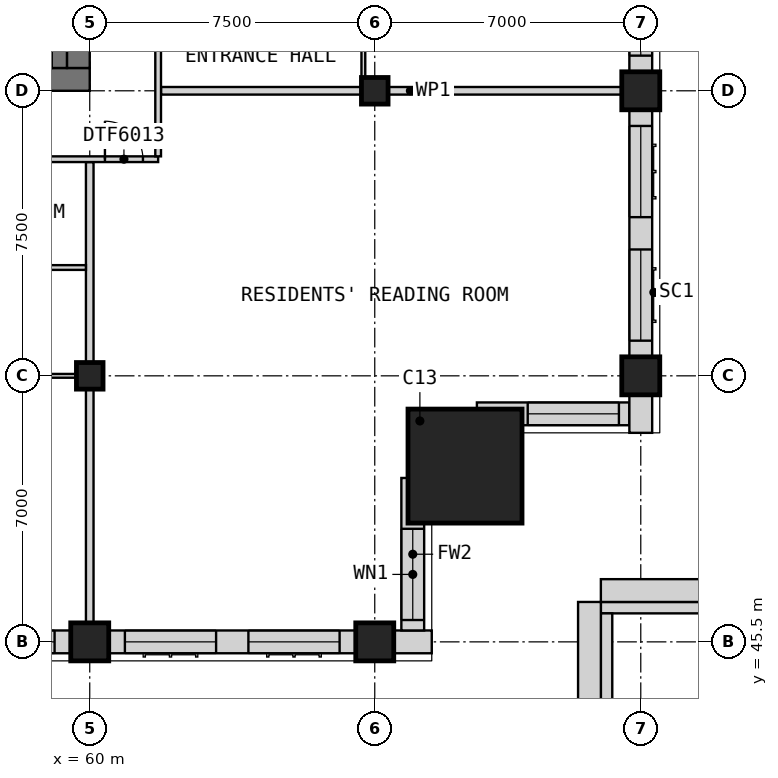
"""IFC4 building model, lengths in metres.
Left out: names, types, materials, properties, quantities, classifications, styles, units other than length and angle.
Written with IfcOpenShell. Run it as: python <this file> out.ifc"""

import sys

from ifc_helpers import new_model, si_unit, direction, frame, frame_2d, origin, origin_2d, place, context, subcontext, project, spatial, rectangle, extrude, element, fill, save


model = new_model("IFC4")
c1 = context("Model", 3, precision=1e-05, world=origin(), true_north=direction((0.0, 1.0)))
c2 = subcontext(c1, "Body", "Model", "MODEL_VIEW")
j1 = project(units=[si_unit("LENGTHUNIT", "METRE"), si_unit("PLANEANGLEUNIT", "RADIAN")], contexts=[c1])
p1 = place(None, origin())
s1 = spatial("IfcSite", under=j1, at=p1, CompositionType="ELEMENT")
p2 = place(p1, origin())
s2 = spatial("IfcBuilding", under=s1, at=p2, CompositionType="ELEMENT")
p3 = place(p2, frame((0.0, 0.0, 266.2)))
s3 = spatial("IfcBuildingStorey", under=s2, at=p3, CompositionType="ELEMENT", Elevation=266.2)
p4 = place(p3, frame((60.0, 45.5, 0.0), z_axis=(0.0, 0.0, 1.0), x_axis=(1.0, 0.0, 0.0)))
e1 = element("IfcColumn", 1, at=p4, inside=s3, PredefinedType="COLUMN", context=c2, shape_type="SweptSolid", body=[
    extrude(rectangle(XDim=1.0, YDim=1.0, at=origin_2d()), origin(), (0.0, 0.0, 1.0), 3.5),
])
p5 = place(p3, frame((60.0, 52.5, 0.0), z_axis=(0.0, 0.0, 1.0), x_axis=(1.0, 0.0, 0.0)))
e2 = element("IfcColumn", 2, at=p5, inside=s3, PredefinedType="COLUMN", context=c2, shape_type="SweptSolid", body=[
    extrude(rectangle(XDim=0.7, YDim=0.7, at=origin_2d()), origin(), (0.0, 0.0, 1.0), 3.5),
])
p6 = place(p3, frame((67.5, 45.5, 0.0), z_axis=(0.0, 0.0, 1.0), x_axis=(1.0, 0.0, 0.0)))
e3 = element("IfcColumn", 3, at=p6, inside=s3, PredefinedType="COLUMN", context=c2, shape_type="SweptSolid", body=[
    extrude(rectangle(XDim=1.0, YDim=1.0, at=origin_2d()), origin(), (0.0, 0.0, 1.0), 3.5),
])
p7 = place(p3, frame((67.5, 60.0, 0.0), z_axis=(0.0, 0.0, 1.0), x_axis=(1.0, 0.0, 0.0)))
e4 = element("IfcColumn", 4, at=p7, inside=s3, PredefinedType="COLUMN", context=c2, shape_type="SweptSolid", body=[
    extrude(rectangle(XDim=0.7, YDim=0.7, at=origin_2d()), origin(), (0.0, 0.0, 1.0), 3.5),
])
for number, where, z_axis, x_axis in (
    (5, (74.5, 52.5, 0.0), (0.0, 0.0, 1.0), (1.0, 0.0, 0.0)),
    (6, (74.5, 60.0, 0.0), (0.0, 0.0, 1.0), (1.0, 0.0, 0.0)),
):
    element("IfcColumn", number, at=place(p3, frame(where, z_axis=z_axis, x_axis=x_axis)), inside=s3, PredefinedType="COLUMN", context=c2, shape_type="SweptSolid", body=[
        extrude(rectangle(XDim=1.0, YDim=1.0, at=origin_2d()), origin(), (0.0, 0.0, 1.0), 3.5),
    ])
p8 = place(p3, frame((69.875, 50.125, 0.0), z_axis=(0.0, 0.0, 1.0), x_axis=(0.0, 1.0, 0.0)))
e7 = element("IfcColumn", 7, at=p8, inside=s3, PredefinedType="COLUMN", context=c2, shape_type="SweptSolid", body=[
    extrude(rectangle(XDim=3.0, YDim=3.0, at=origin_2d()), origin(), (0.49, 0.49, 0.722), 4.851),
])
p9 = place(p3, frame((30.0, 60.3, 0.0), z_axis=(0.0, 0.0, 1.0), x_axis=(1.0, 0.0, 0.0)))
e8 = element("IfcWall", 8, at=p9, inside=s3, PredefinedType="SHEAR", context=c2, shape_type="SweptSolid", body=[
    extrude(rectangle(XDim=30.0, YDim=0.6, at=frame_2d((15.0, 0.0))), origin(), (0.0, 0.0, 1.0), 3.5),
])
p10 = place(p9, frame((21.9, 0.0, 0.0)))
e9 = element("IfcOpeningElement", 9, at=p10, cuts=e8, PredefinedType="OPENING", context=c2, shape_type="SweptSolid", body=[
    extrude(rectangle(XDim=1.8, YDim=2.1, at=frame_2d((0.9, 1.05))), frame((0.0, 0.31, 0.0), z_axis=(0.0, -1.0, 0.0), x_axis=(1.0, 0.0, 0.0)), (0.0, 0.0, 1.0), 0.62),
])
p11 = place(p9, frame((26.5, 0.0, 0.0)))
e10 = element("IfcOpeningElement", 10, at=p11, cuts=e8, PredefinedType="OPENING", context=c2, shape_type="SweptSolid", body=[
    extrude(rectangle(XDim=1.2, YDim=2.1, at=frame_2d((0.6, 1.05))), frame((0.0, 0.31, 0.0), z_axis=(0.0, -1.0, 0.0), x_axis=(1.0, 0.0, 0.0)), (0.0, 0.0, 1.0), 0.62),
])
p12 = place(p3, frame((59.7, 60.6, 0.0), z_axis=(0.0, 0.0, 1.0), x_axis=(0.0, 1.0, 0.0)))
e11 = element("IfcWall", 11, at=p12, inside=s3, PredefinedType="SHEAR", context=c2, shape_type="SweptSolid", body=[
    extrude(rectangle(XDim=21.3, YDim=0.6, at=frame_2d((10.65, 0.0))), origin(), (0.0, 0.0, 1.0), 3.5),
])
p13 = place(p12, frame((14.9, 0.0, 0.0)))
e12 = element("IfcOpeningElement", 12, at=p13, cuts=e11, PredefinedType="OPENING", context=c2, shape_type="SweptSolid", body=[
    extrude(rectangle(XDim=1.8, YDim=2.1, at=frame_2d((0.9, 1.05))), frame((0.0, 0.31, 0.0), z_axis=(0.0, -1.0, 0.0), x_axis=(1.0, 0.0, 0.0)), (0.0, 0.0, 1.0), 0.62),
])
p14 = place(p3, frame((73.45, 46.4, 0.0), z_axis=(0.0, 0.0, 1.0), x_axis=(1.0, 0.0, 0.0)))
e13 = element("IfcWall", 13, at=p14, inside=s3, PredefinedType="PARAPET", context=c2, shape_type="SweptSolid", body=[
    extrude(rectangle(XDim=5.0, YDim=0.3, at=frame_2d((2.5, 0.0))), origin(), (0.0, 0.0, 1.0), 1.2),
])
p15 = place(p3, frame((73.45, 46.85, 0.0), z_axis=(0.0, 0.0, 1.0), x_axis=(1.0, 0.0, 0.0)))
e14 = element("IfcWall", 14, at=p15, inside=s3, PredefinedType="STANDARD", context=c2, shape_type="SweptSolid", body=[
    extrude(rectangle(XDim=4.4, YDim=0.6, at=frame_2d((2.2, 0.0))), origin(), (0.0, 0.0, 1.0), 0.6),
])
p16 = place(p3, frame((73.6, 41.25, 0.0), z_axis=(0.0, 0.0, 1.0), x_axis=(0.0, 1.0, 0.0)))
e15 = element("IfcWall", 15, at=p16, inside=s3, PredefinedType="PARAPET", context=c2, shape_type="SweptSolid", body=[
    extrude(rectangle(XDim=5.0, YDim=0.3, at=frame_2d((2.5, 0.0))), origin(), (0.0, 0.0, 1.0), 1.2),
])
p17 = place(p3, frame((73.15, 46.55, 0.0), z_axis=(0.0, 0.0, 1.0), x_axis=(0.0, -1.0, 0.0)))
e16 = element("IfcWall", 16, at=p17, inside=s3, PredefinedType="STANDARD", context=c2, shape_type="SweptSolid", body=[
    extrude(rectangle(XDim=5.3, YDim=0.6, at=frame_2d((2.65, 0.0))), origin(), (0.0, 0.0, 1.0), 0.6),
])
p18 = place(p3, frame((53.0, 45.5, 0.0), z_axis=(0.0, 0.0, 1.0), x_axis=(1.0, 0.0, 0.0)))
e17 = element("IfcWall", 17, at=p18, inside=s3, PredefinedType="SOLIDWALL", context=c2, shape_type="SweptSolid", body=[
    extrude(rectangle(XDim=6.5, YDim=0.6, at=frame_2d((3.25, 0.0))), origin(), (0.0, 0.0, 1.0), 2.75),
])
p19 = place(p18, frame((0.425, 0.0, 0.8)))
e18 = element("IfcOpeningElement", 18, at=p19, cuts=e17, PredefinedType="OPENING", context=c2, shape_type="SweptSolid", body=[
    extrude(rectangle(XDim=2.4, YDim=1.8, at=frame_2d((1.2, 0.9))), frame((0.0, 0.31, 0.0), z_axis=(0.0, -1.0, 0.0), x_axis=(1.0, 0.0, 0.0)), (0.0, 0.0, 1.0), 0.62),
])
p20 = place(p18, frame((3.675, 0.0, 0.8)))
e19 = element("IfcOpeningElement", 19, at=p20, cuts=e17, PredefinedType="OPENING", context=c2, shape_type="SweptSolid", body=[
    extrude(rectangle(XDim=2.4, YDim=1.8, at=frame_2d((1.2, 0.9))), frame((0.0, 0.31, 0.0), z_axis=(0.0, -1.0, 0.0), x_axis=(1.0, 0.0, 0.0)), (0.0, 0.0, 1.0), 0.62),
])
p21 = place(p3, frame((60.5, 45.5, 0.0), z_axis=(0.0, 0.0, 1.0), x_axis=(1.0, 0.0, 0.0)))
e20 = element("IfcWall", 20, at=p21, inside=s3, PredefinedType="SOLIDWALL", context=c2, shape_type="SweptSolid", body=[
    extrude(rectangle(XDim=6.5, YDim=0.6, at=frame_2d((3.25, 0.0))), origin(), (0.0, 0.0, 1.0), 2.75),
])
p22 = place(p21, frame((0.425, 0.0, 0.8)))
e21 = element("IfcOpeningElement", 21, at=p22, cuts=e20, PredefinedType="OPENING", context=c2, shape_type="SweptSolid", body=[
    extrude(rectangle(XDim=2.4, YDim=1.8, at=frame_2d((1.2, 0.9))), frame((0.0, 0.31, 0.0), z_axis=(0.0, -1.0, 0.0), x_axis=(1.0, 0.0, 0.0)), (0.0, 0.0, 1.0), 0.62),
])
p23 = place(p21, frame((3.675, 0.0, 0.8)))
e22 = element("IfcOpeningElement", 22, at=p23, cuts=e20, PredefinedType="OPENING", context=c2, shape_type="SweptSolid", body=[
    extrude(rectangle(XDim=2.4, YDim=1.8, at=frame_2d((1.2, 0.9))), frame((0.0, 0.31, 0.0), z_axis=(0.0, -1.0, 0.0), x_axis=(1.0, 0.0, 0.0)), (0.0, 0.0, 1.0), 0.62),
])
p24 = place(p3, frame((68.0, 45.5, 0.0), z_axis=(0.0, 0.0, 1.0), x_axis=(1.0, 0.0, 0.0)))
e23 = element("IfcWall", 23, at=p24, inside=s3, PredefinedType="SOLIDWALL", context=c2, shape_type="SweptSolid", body=[
    extrude(rectangle(XDim=1.0, YDim=0.6, at=frame_2d((0.5, 0.0))), origin(), (0.0, 0.0, 1.0), 3.25),
])
p25 = place(p3, frame((68.5, 45.8, 0.0), z_axis=(0.0, 0.0, 1.0), x_axis=(0.0, 1.0, 0.0)))
e24 = element("IfcWall", 24, at=p25, inside=s3, PredefinedType="SOLIDWALL", context=c2, shape_type="SweptSolid", body=[
    extrude(rectangle(XDim=4.012, YDim=0.6, at=frame_2d((2.006, 0.0))), origin(), (0.0, 0.0, 1.0), 3.25),
])
p26 = place(p25, frame((0.275, 0.0, 0.8)))
e25 = element("IfcOpeningElement", 25, at=p26, cuts=e24, PredefinedType="OPENING", context=c2, shape_type="SweptSolid", body=[
    extrude(rectangle(XDim=2.4, YDim=1.8, at=frame_2d((1.2, 0.9))), frame((0.0, 0.31, 0.0), z_axis=(0.0, -1.0, 0.0), x_axis=(1.0, 0.0, 0.0)), (0.0, 0.0, 1.0), 0.62),
])
p27 = place(p3, frame((70.188, 51.5, 0.0), z_axis=(0.0, 0.0, 1.0), x_axis=(1.0, 0.0, 0.0)))
e26 = element("IfcWall", 26, at=p27, inside=s3, PredefinedType="SOLIDWALL", context=c2, shape_type="SweptSolid", body=[
    extrude(rectangle(XDim=4.012, YDim=0.6, at=frame_2d((2.006, 0.0))), origin(), (0.0, 0.0, 1.0), 3.25),
])
p28 = place(p27, frame((1.337, 0.0, 0.8)))
e27 = element("IfcOpeningElement", 27, at=p28, cuts=e26, PredefinedType="OPENING", context=c2, shape_type="SweptSolid", body=[
    extrude(rectangle(XDim=2.4, YDim=1.8, at=frame_2d((1.2, 0.9))), frame((0.0, 0.31, 0.0), z_axis=(0.0, -1.0, 0.0), x_axis=(1.0, 0.0, 0.0)), (0.0, 0.0, 1.0), 0.62),
])
p29 = place(p3, frame((74.5, 51.0, 0.0), z_axis=(0.0, 0.0, 1.0), x_axis=(0.0, 1.0, 0.0)))
e28 = element("IfcWall", 28, at=p29, inside=s3, PredefinedType="SOLIDWALL", context=c2, shape_type="SweptSolid", body=[
    extrude(rectangle(XDim=1.0, YDim=0.6, at=frame_2d((0.5, 0.0))), origin(), (0.0, 0.0, 1.0), 3.25),
])
p30 = place(p3, frame((74.5, 53.0, 0.0), z_axis=(0.0, 0.0, 1.0), x_axis=(0.0, 1.0, 0.0)))
e29 = element("IfcWall", 29, at=p30, inside=s3, PredefinedType="SOLIDWALL", context=c2, shape_type="SweptSolid", body=[
    extrude(rectangle(XDim=6.5, YDim=0.6, at=frame_2d((3.25, 0.0))), origin(), (0.0, 0.0, 1.0), 2.75),
])
p31 = place(p30, frame((0.425, 0.0, 0.8)))
e30 = element("IfcOpeningElement", 30, at=p31, cuts=e29, PredefinedType="OPENING", context=c2, shape_type="SweptSolid", body=[
    extrude(rectangle(XDim=2.4, YDim=1.8, at=frame_2d((1.2, 0.9))), frame((0.0, 0.31, 0.0), z_axis=(0.0, -1.0, 0.0), x_axis=(1.0, 0.0, 0.0)), (0.0, 0.0, 1.0), 0.62),
])
p32 = place(p30, frame((3.675, 0.0, 0.8)))
e31 = element("IfcOpeningElement", 31, at=p32, cuts=e29, PredefinedType="OPENING", context=c2, shape_type="SweptSolid", body=[
    extrude(rectangle(XDim=2.4, YDim=1.8, at=frame_2d((1.2, 0.9))), frame((0.0, 0.31, 0.0), z_axis=(0.0, -1.0, 0.0), x_axis=(1.0, 0.0, 0.0)), (0.0, 0.0, 1.0), 0.62),
])
p33 = place(p3, frame((74.5, 60.5, 0.0), z_axis=(0.0, 0.0, 1.0), x_axis=(0.0, 1.0, 0.0)))
e32 = element("IfcWall", 32, at=p33, inside=s3, PredefinedType="SOLIDWALL", context=c2, shape_type="SweptSolid", body=[
    extrude(rectangle(XDim=6.5, YDim=0.6, at=frame_2d((3.25, 0.0))), origin(), (0.0, 0.0, 1.0), 2.75),
])
p34 = place(p33, frame((0.425, 0.0, 0.8)))
e33 = element("IfcOpeningElement", 33, at=p34, cuts=e32, PredefinedType="OPENING", context=c2, shape_type="SweptSolid", body=[
    extrude(rectangle(XDim=2.4, YDim=1.8, at=frame_2d((1.2, 0.9))), frame((0.0, 0.31, 0.0), z_axis=(0.0, -1.0, 0.0), x_axis=(1.0, 0.0, 0.0)), (0.0, 0.0, 1.0), 0.62),
])
p35 = place(p33, frame((3.675, 0.0, 0.8)))
e34 = element("IfcOpeningElement", 34, at=p35, cuts=e32, PredefinedType="OPENING", context=c2, shape_type="SweptSolid", body=[
    extrude(rectangle(XDim=2.4, YDim=1.8, at=frame_2d((1.2, 0.9))), frame((0.0, 0.31, 0.0), z_axis=(0.0, -1.0, 0.0), x_axis=(1.0, 0.0, 0.0)), (0.0, 0.0, 1.0), 0.62),
])
p36 = place(p3, frame((59.2, 60.6, 0.0), z_axis=(0.0, 0.0, 1.0), x_axis=(0.0, 1.0, 0.0)))
e35 = element("IfcWall", 35, at=p36, inside=s3, PredefinedType="SOLIDWALL", context=c2, shape_type="SweptSolid", body=[
    extrude(rectangle(XDim=7.9, YDim=0.4, at=frame_2d((3.95, 0.0))), origin(), (0.0, 0.0, 1.0), 3.25),
])
for number, where, z_axis, x_axis in (
    (36, (61.875, 60.0, 0.0), (0.0, 0.0, 1.0), (1.0, 0.0, 0.0)),
    (37, (60.0, 45.0, 0.0), (0.0, 0.0, 1.0), (0.0, 1.0, 0.0)),
):
    element("IfcWall", number, at=place(p3, frame(where, z_axis=z_axis, x_axis=x_axis)), inside=s3, PredefinedType="PARTITIONING", context=c2, shape_type="SweptSolid", body=[
        extrude(rectangle(XDim=13.125, YDim=0.2, at=frame_2d((6.562, 0.0))), origin(), (0.0, 0.0, 1.0), 3.25),
    ])
p37 = place(p3, frame((33.75, 58.2, 0.0), z_axis=(0.0, 0.0, 1.0), x_axis=(1.0, 0.0, 0.0)))
e38 = element("IfcWall", 38, at=p37, inside=s3, PredefinedType="PARTITIONING", context=c2, shape_type="SweptSolid", body=[
    extrude(rectangle(XDim=28.05, YDim=0.15, at=frame_2d((14.025, 0.0))), origin(), (0.0, 0.0, 1.0), 3.25),
])
p38 = place(p37, frame((3.25, 0.0, 0.0)))
e39 = element("IfcOpeningElement", 39, at=p38, cuts=e38, PredefinedType="OPENING", context=c2, shape_type="SweptSolid", body=[
    extrude(rectangle(XDim=1.0, YDim=2.1, at=frame_2d((0.5, 1.05))), frame((0.0, 0.085, 0.0), z_axis=(0.0, -1.0, 0.0), x_axis=(1.0, 0.0, 0.0)), (0.0, 0.0, 1.0), 0.17),
])
p39 = place(p37, frame((8.925, 0.0, 0.0)))
e40 = element("IfcOpeningElement", 40, at=p39, cuts=e38, PredefinedType="OPENING", context=c2, shape_type="SweptSolid", body=[
    extrude(rectangle(XDim=0.9, YDim=2.1, at=frame_2d((0.45, 1.05))), frame((0.0, 0.085, 0.0), z_axis=(0.0, -1.0, 0.0), x_axis=(1.0, 0.0, 0.0)), (0.0, 0.0, 1.0), 0.17),
])
p40 = place(p37, frame((20.175, 0.0, 0.0)))
e41 = element("IfcOpeningElement", 41, at=p40, cuts=e38, PredefinedType="OPENING", context=c2, shape_type="SweptSolid", body=[
    extrude(rectangle(XDim=0.9, YDim=2.1, at=frame_2d((0.45, 1.05))), frame((0.0, 0.085, 0.0), z_axis=(0.0, -1.0, 0.0), x_axis=(1.0, 0.0, 0.0)), (0.0, 0.0, 1.0), 0.17),
])
p41 = place(p37, frame((26.65, 0.0, 0.0)))
e42 = element("IfcOpeningElement", 42, at=p41, cuts=e38, PredefinedType="OPENING", context=c2, shape_type="SweptSolid", body=[
    extrude(rectangle(XDim=1.0, YDim=2.1, at=frame_2d((0.5, 1.05))), frame((0.0, 0.085, 0.0), z_axis=(0.0, -1.0, 0.0), x_axis=(1.0, 0.0, 0.0)), (0.0, 0.0, 1.0), 0.17),
])
p42 = place(p3, frame((61.8, 58.275, 0.0), z_axis=(0.0, 0.0, 1.0), x_axis=(0.0, 1.0, 0.0)))
e43 = element("IfcWall", 43, at=p42, inside=s3, PredefinedType="PARTITIONING", context=c2, shape_type="SweptSolid", body=[
    extrude(rectangle(XDim=25.95, YDim=0.15, at=frame_2d((12.975, 0.0))), origin(), (0.0, 0.0, 1.0), 3.25),
])
p43 = place(p42, frame((3.15, 0.0, 0.0)))
e44 = element("IfcOpeningElement", 44, at=p43, cuts=e43, PredefinedType="OPENING", context=c2, shape_type="SweptSolid", body=[
    extrude(rectangle(XDim=0.9, YDim=2.1, at=frame_2d((0.45, 1.05))), frame((0.0, 0.085, 0.0), z_axis=(0.0, -1.0, 0.0), x_axis=(1.0, 0.0, 0.0)), (0.0, 0.0, 1.0), 0.17),
])
p44 = place(p42, frame((14.4, 0.0, 0.0)))
e45 = element("IfcOpeningElement", 45, at=p44, cuts=e43, PredefinedType="OPENING", context=c2, shape_type="SweptSolid", body=[
    extrude(rectangle(XDim=0.9, YDim=2.1, at=frame_2d((0.45, 1.05))), frame((0.0, 0.085, 0.0), z_axis=(0.0, -1.0, 0.0), x_axis=(1.0, 0.0, 0.0)), (0.0, 0.0, 1.0), 0.17),
])
p45 = place(p3, frame((41.35, 52.5, 0.0), z_axis=(0.0, 0.0, 1.0), x_axis=(1.0, 0.0, 0.0)))
e46 = element("IfcWall", 46, at=p45, inside=s3, PredefinedType="PARTITIONING", context=c2, shape_type="SweptSolid", body=[
    extrude(rectangle(XDim=18.55, YDim=0.1, at=frame_2d((9.275, 0.0))), origin(), (0.0, 0.0, 1.0), 3.25),
])
p46 = place(p45, frame((1.325, 0.0, 0.0)))
e47 = element("IfcOpeningElement", 47, at=p46, cuts=e46, PredefinedType="OPENING", context=c2, shape_type="SweptSolid", body=[
    extrude(rectangle(XDim=0.9, YDim=2.1, at=frame_2d((0.45, 1.05))), frame((0.0, 0.06, 0.0), z_axis=(0.0, -1.0, 0.0), x_axis=(1.0, 0.0, 0.0)), (0.0, 0.0, 1.0), 0.12),
])
p47 = place(p45, frame((8.825, 0.0, 0.0)))
e48 = element("IfcOpeningElement", 48, at=p47, cuts=e46, PredefinedType="OPENING", context=c2, shape_type="SweptSolid", body=[
    extrude(rectangle(XDim=0.9, YDim=2.1, at=frame_2d((0.45, 1.05))), frame((0.0, 0.06, 0.0), z_axis=(0.0, -1.0, 0.0), x_axis=(1.0, 0.0, 0.0)), (0.0, 0.0, 1.0), 0.12),
])
p48 = place(p45, frame((12.575, 0.0, 0.0)))
e49 = element("IfcOpeningElement", 49, at=p48, cuts=e46, PredefinedType="OPENING", context=c2, shape_type="SweptSolid", body=[
    extrude(rectangle(XDim=0.9, YDim=2.1, at=frame_2d((0.45, 1.05))), frame((0.0, 0.06, 0.0), z_axis=(0.0, -1.0, 0.0), x_axis=(1.0, 0.0, 0.0)), (0.0, 0.0, 1.0), 0.12),
])
p49 = place(p3, frame((67.2, 60.1, 0.0), z_axis=(0.0, 0.0, 1.0), x_axis=(0.0, 1.0, 0.0)))
e50 = element("IfcWall", 50, at=p49, inside=s3, PredefinedType="PARTITIONING", context=c2, shape_type="SweptSolid", body=[
    extrude(rectangle(XDim=22.3, YDim=0.1, at=frame_2d((11.15, 0.0))), origin(), (0.0, 0.0, 1.0), 3.25),
])
p50 = place(p49, frame((1.325, 0.0, 0.0)))
e51 = element("IfcOpeningElement", 51, at=p50, cuts=e50, PredefinedType="OPENING", context=c2, shape_type="SweptSolid", body=[
    extrude(rectangle(XDim=0.9, YDim=2.1, at=frame_2d((0.45, 1.05))), frame((0.0, 0.06, 0.0), z_axis=(0.0, -1.0, 0.0), x_axis=(1.0, 0.0, 0.0)), (0.0, 0.0, 1.0), 0.12),
])
p51 = place(p49, frame((8.825, 0.0, 0.0)))
e52 = element("IfcOpeningElement", 52, at=p51, cuts=e50, PredefinedType="OPENING", context=c2, shape_type="SweptSolid", body=[
    extrude(rectangle(XDim=0.9, YDim=2.1, at=frame_2d((0.45, 1.05))), frame((0.0, 0.06, 0.0), z_axis=(0.0, -1.0, 0.0), x_axis=(1.0, 0.0, 0.0)), (0.0, 0.0, 1.0), 0.12),
])
p52 = place(p49, frame((12.575, 0.0, 0.0)))
e53 = element("IfcOpeningElement", 53, at=p52, cuts=e50, PredefinedType="OPENING", context=c2, shape_type="SweptSolid", body=[
    extrude(rectangle(XDim=0.9, YDim=2.1, at=frame_2d((0.45, 1.05))), frame((0.0, 0.06, 0.0), z_axis=(0.0, -1.0, 0.0), x_axis=(1.0, 0.0, 0.0)), (0.0, 0.0, 1.0), 0.12),
])
p53 = place(p49, frame((20.075, 0.0, 0.0)))
e54 = element("IfcOpeningElement", 54, at=p53, cuts=e50, PredefinedType="OPENING", context=c2, shape_type="SweptSolid", body=[
    extrude(rectangle(XDim=0.9, YDim=2.1, at=frame_2d((0.45, 1.05))), frame((0.0, 0.06, 0.0), z_axis=(0.0, -1.0, 0.0), x_axis=(1.0, 0.0, 0.0)), (0.0, 0.0, 1.0), 0.12),
])
p54 = place(p3, frame((56.25, 55.35, 0.0), z_axis=(0.0, 0.0, 1.0), x_axis=(1.0, 0.0, 0.0)))
e55 = element("IfcWall", 55, at=p54, inside=s3, PredefinedType="PARTITIONING", context=c2, shape_type="SweptSolid", body=[
    extrude(rectangle(XDim=3.65, YDim=0.125, at=frame_2d((1.825, 0.0))), origin(), (0.0, 0.0, 1.0), 3.25),
])
p55 = place(p20, origin())
e56 = element("IfcWindow", 56, at=p55, inside=s3, PartitioningType="SINGLE_PANEL", PredefinedType="WINDOW", context=c2, shape_type="SweptSolid", body=[
    extrude(rectangle(XDim=2.4, YDim=1.8, at=frame_2d((1.2, 0.9))), frame((0.0, -0.07, 0.0), z_axis=(0.0, -1.0, 0.0), x_axis=(1.0, 0.0, 0.0)), (0.0, 0.0, 1.0), 0.06),
])
fill(e19, e56)
p56 = place(p22, origin())
e57 = element("IfcWindow", 57, at=p56, inside=s3, PartitioningType="SINGLE_PANEL", PredefinedType="WINDOW", context=c2, shape_type="SweptSolid", body=[
    extrude(rectangle(XDim=2.4, YDim=1.8, at=frame_2d((1.2, 0.9))), frame((0.0, -0.07, 0.0), z_axis=(0.0, -1.0, 0.0), x_axis=(1.0, 0.0, 0.0)), (0.0, 0.0, 1.0), 0.06),
])
fill(e21, e57)
p57 = place(p23, origin())
e58 = element("IfcWindow", 58, at=p57, inside=s3, PartitioningType="SINGLE_PANEL", PredefinedType="WINDOW", context=c2, shape_type="SweptSolid", body=[
    extrude(rectangle(XDim=2.4, YDim=1.8, at=frame_2d((1.2, 0.9))), frame((0.0, -0.07, 0.0), z_axis=(0.0, -1.0, 0.0), x_axis=(1.0, 0.0, 0.0)), (0.0, 0.0, 1.0), 0.06),
])
fill(e22, e58)
p58 = place(p26, origin())
e59 = element("IfcWindow", 59, at=p58, inside=s3, PartitioningType="SINGLE_PANEL", PredefinedType="WINDOW", context=c2, shape_type="SweptSolid", body=[
    extrude(rectangle(XDim=2.4, YDim=1.8, at=frame_2d((1.2, 0.9))), frame((0.0, -0.07, 0.0), z_axis=(0.0, -1.0, 0.0), x_axis=(1.0, 0.0, 0.0)), (0.0, 0.0, 1.0), 0.06),
])
fill(e25, e59)
p59 = place(p28, origin())
e60 = element("IfcWindow", 60, at=p59, inside=s3, PartitioningType="SINGLE_PANEL", PredefinedType="WINDOW", context=c2, shape_type="SweptSolid", body=[
    extrude(rectangle(XDim=2.4, YDim=1.8, at=frame_2d((1.2, 0.9))), frame((0.0, -0.07, 0.0), z_axis=(0.0, -1.0, 0.0), x_axis=(1.0, 0.0, 0.0)), (0.0, 0.0, 1.0), 0.06),
])
fill(e27, e60)
p60 = place(p31, origin())
e61 = element("IfcWindow", 61, at=p60, inside=s3, PartitioningType="SINGLE_PANEL", PredefinedType="WINDOW", context=c2, shape_type="SweptSolid", body=[
    extrude(rectangle(XDim=2.4, YDim=1.8, at=frame_2d((1.2, 0.9))), frame((0.0, -0.07, 0.0), z_axis=(0.0, -1.0, 0.0), x_axis=(1.0, 0.0, 0.0)), (0.0, 0.0, 1.0), 0.06),
])
fill(e30, e61)
p61 = place(p32, origin())
e62 = element("IfcWindow", 62, at=p61, inside=s3, PartitioningType="SINGLE_PANEL", PredefinedType="WINDOW", context=c2, shape_type="SweptSolid", body=[
    extrude(rectangle(XDim=2.4, YDim=1.8, at=frame_2d((1.2, 0.9))), frame((0.0, -0.07, 0.0), z_axis=(0.0, -1.0, 0.0), x_axis=(1.0, 0.0, 0.0)), (0.0, 0.0, 1.0), 0.06),
])
fill(e31, e62)
p62 = place(p34, origin())
e63 = element("IfcWindow", 63, at=p62, inside=s3, PartitioningType="SINGLE_PANEL", PredefinedType="WINDOW", context=c2, shape_type="SweptSolid", body=[
    extrude(rectangle(XDim=2.4, YDim=1.8, at=frame_2d((1.2, 0.9))), frame((0.0, -0.07, 0.0), z_axis=(0.0, -1.0, 0.0), x_axis=(1.0, 0.0, 0.0)), (0.0, 0.0, 1.0), 0.06),
])
fill(e33, e63)
p63 = place(p41, origin())
e64 = element("IfcDoor", 64, at=p63, inside=s3, OperationType="SINGLE_SWING_RIGHT", PredefinedType="DOOR", context=c2, shape_type="SweptSolid", body=[
    extrude(rectangle(XDim=1.0, YDim=2.1, at=frame_2d((0.5, 1.05))), frame((0.0, 0.025, 0.0), z_axis=(0.0, -1.0, 0.0), x_axis=(1.0, 0.0, 0.0)), (0.0, 0.0, 1.0), 0.05),
])
fill(e42, e64)
save(model, sys.argv[1])
